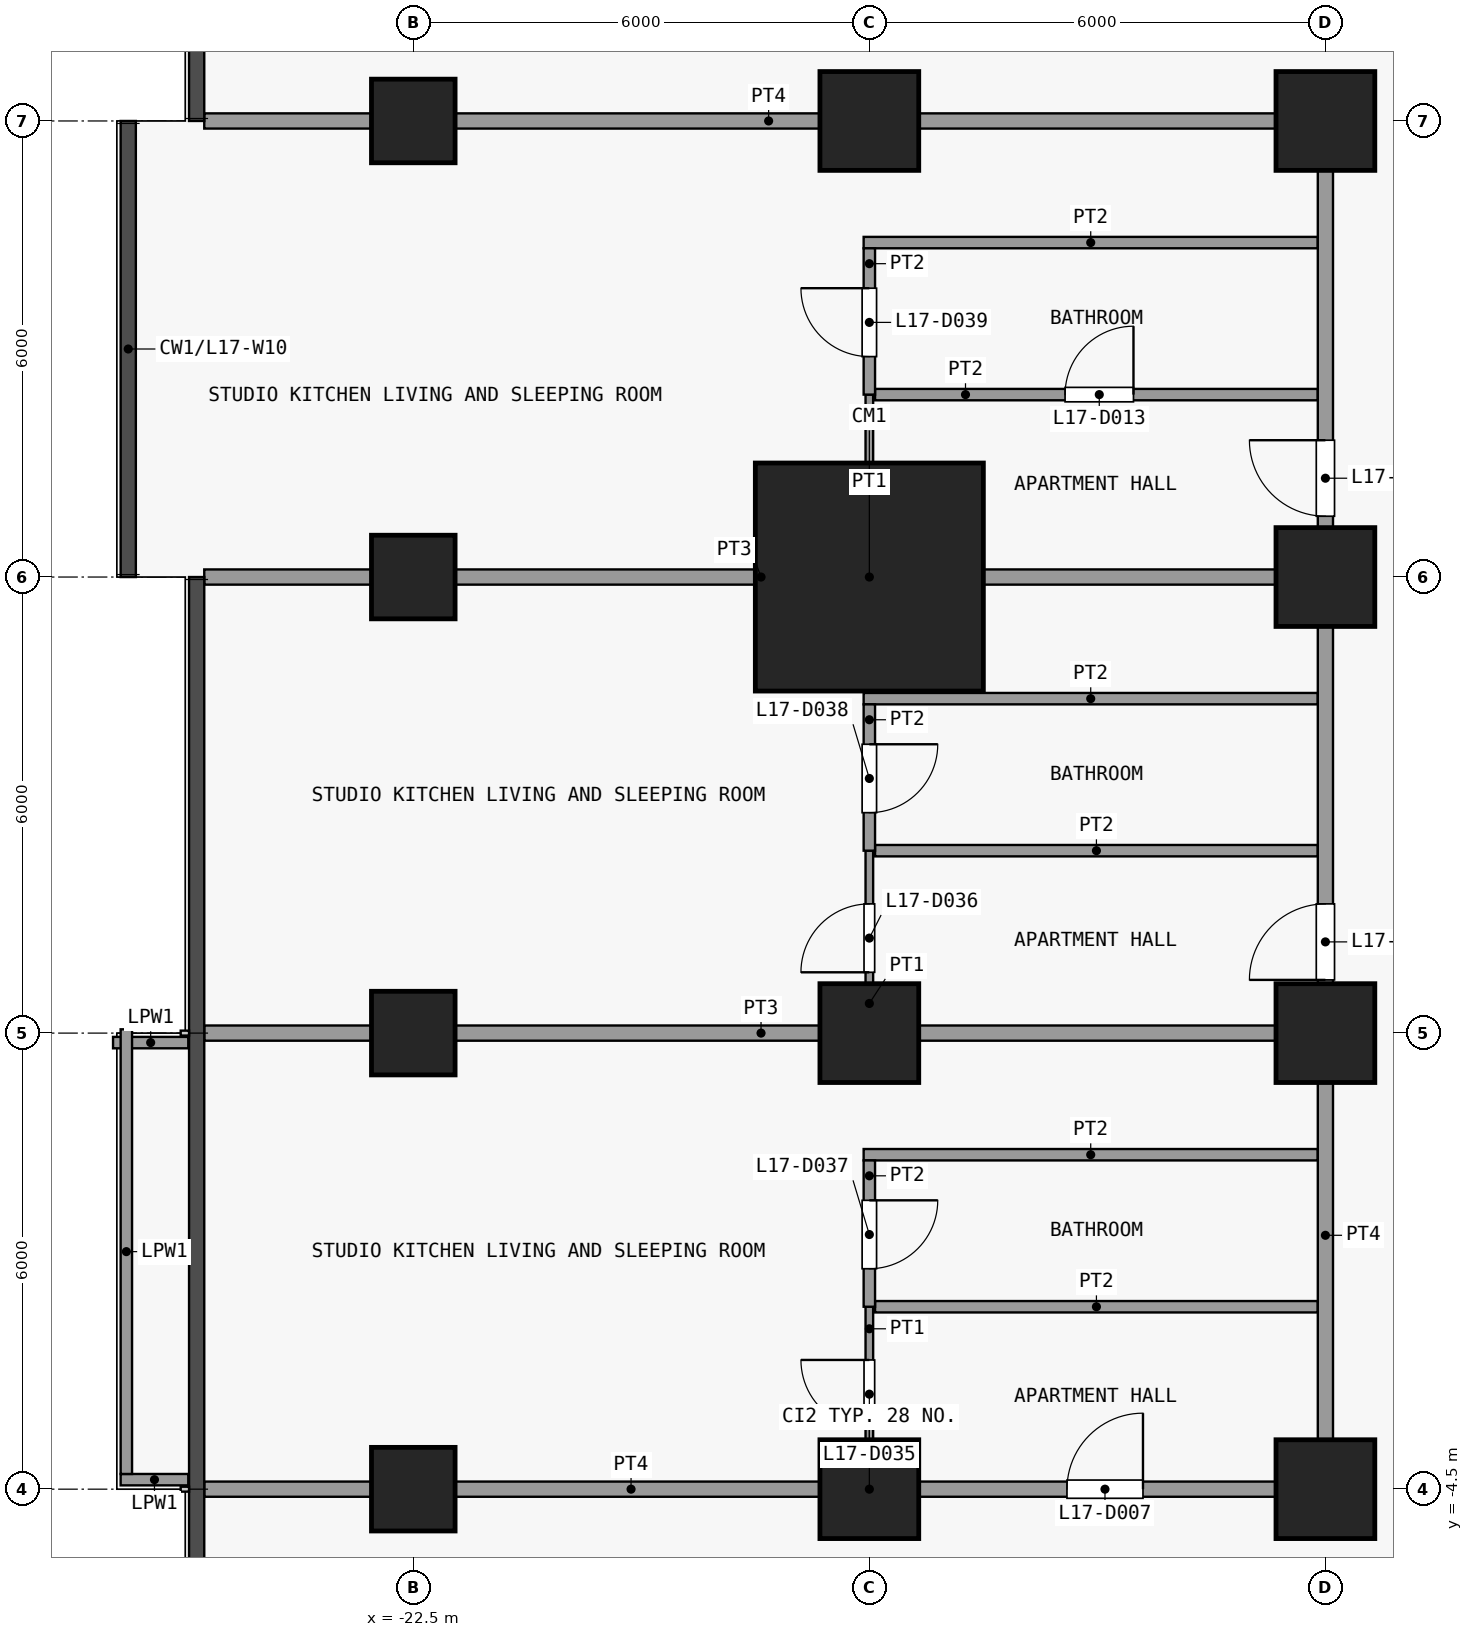
"""IFC4 building model, lengths in metres.
Left out: names, types, materials, properties, quantities, classifications, styles, units other than length and angle.
Written with IfcOpenShell. Run it as: python <this file> out.ifc"""

import sys

from ifc_helpers import new_model, si_unit, direction, frame, frame_2d, origin, origin_2d, place, context, subcontext, project, spatial, rectangle, extrude, element, fill, save


model = new_model("IFC4")
c1 = context("Model", 3, precision=1e-05, world=origin(), true_north=direction((0.0, 1.0)))
c2 = subcontext(c1, "Body", "Model", "MODEL_VIEW")
j1 = project(units=[si_unit("LENGTHUNIT", "METRE"), si_unit("PLANEANGLEUNIT", "RADIAN")], contexts=[c1])
p1 = place(None, origin())
s1 = spatial("IfcSite", under=j1, at=p1, CompositionType="ELEMENT")
p2 = place(p1, origin())
s2 = spatial("IfcBuilding", under=s1, at=p2, CompositionType="ELEMENT")
p3 = place(p2, frame((0.0, 0.0, 72.1)))
s3 = spatial("IfcBuildingStorey", under=s2, at=p3, CompositionType="ELEMENT", Elevation=72.1)
for number, where, z_axis, x_axis in (
    (1, (-22.5, -4.5, 0.0), (0.0, 0.0, 1.0), (1.0, 0.0, 0.0)),
    (2, (-22.5, 1.5, 0.0), (0.0, 0.0, 1.0), (1.0, 0.0, 0.0)),
    (3, (-22.5, 7.5, 0.0), (0.0, 0.0, 1.0), (1.0, 0.0, 0.0)),
    (4, (-22.5, 13.5, 0.0), (0.0, 0.0, 1.0), (1.0, 0.0, 0.0)),
):
    element("IfcColumn", number, at=place(p3, frame(where, z_axis=z_axis, x_axis=x_axis)), inside=s3, PredefinedType="COLUMN", context=c2, shape_type="SweptSolid", body=[
        extrude(rectangle(XDim=1.1, YDim=1.1, at=origin_2d()), origin(), (0.0, 0.0, 1.0), 3.6),
    ])
for number, where, z_axis, x_axis in (
    (5, (-16.5, -4.5, 0.0), (0.0, 0.0, 1.0), (1.0, 0.0, 0.0)),
    (6, (-16.5, 1.5, 0.0), (0.0, 0.0, 1.0), (1.0, 0.0, 0.0)),
):
    element("IfcColumn", number, at=place(p3, frame(where, z_axis=z_axis, x_axis=x_axis)), inside=s3, PredefinedType="COLUMN", context=c2, shape_type="SweptSolid", body=[
        extrude(rectangle(XDim=1.3, YDim=1.3, at=origin_2d()), origin(), (0.0, 0.0, 1.0), 3.6),
    ])
p4 = place(p3, frame((-16.5, 7.5, 0.0), z_axis=(0.0, 0.0, 1.0), x_axis=(1.0, 0.0, 0.0)))
e7 = element("IfcColumn", 7, at=p4, inside=s3, PredefinedType="COLUMN", context=c2, shape_type="SweptSolid", body=[
    extrude(rectangle(XDim=3.0, YDim=3.0, at=origin_2d()), origin(), (0.0, 0.0, 1.0), 3.6),
])
for number, where, z_axis, x_axis in (
    (8, (-16.5, 13.5, 0.0), (0.0, 0.0, 1.0), (1.0, 0.0, 0.0)),
    (9, (-10.5, -4.5, 0.0), (0.0, 0.0, 1.0), (1.0, 0.0, 0.0)),
    (10, (-10.5, 1.5, 0.0), (0.0, 0.0, 1.0), (1.0, 0.0, 0.0)),
    (11, (-10.5, 7.5, 0.0), (0.0, 0.0, 1.0), (1.0, 0.0, 0.0)),
    (12, (-10.5, 13.5, 0.0), (0.0, 0.0, 1.0), (1.0, 0.0, 0.0)),
):
    element("IfcColumn", number, at=place(p3, frame(where, z_axis=z_axis, x_axis=x_axis)), inside=s3, PredefinedType="COLUMN", context=c2, shape_type="SweptSolid", body=[
        extrude(rectangle(XDim=1.3, YDim=1.3, at=origin_2d()), origin(), (0.0, 0.0, 1.0), 3.6),
    ])
p5 = place(p3, frame((-26.45, 1.375, 0.0), z_axis=(0.0, 0.0, 1.0), x_axis=(1.0, 0.0, 0.0)))
e13 = element("IfcWall", 13, at=p5, inside=s3, PredefinedType="PARAPET", context=c2, shape_type="SweptSolid", body=[
    extrude(rectangle(XDim=0.99, YDim=0.15, at=frame_2d((0.495, 0.0))), origin(), (0.0, 0.0, 1.0), 1.15),
])
p6 = place(p3, frame((-25.46, -4.375, 0.0), z_axis=(0.0, 0.0, 1.0), x_axis=(-1.0, 0.0, 0.0)))
e14 = element("IfcWall", 14, at=p6, inside=s3, PredefinedType="PARAPET", context=c2, shape_type="SweptSolid", body=[
    extrude(rectangle(XDim=0.89, YDim=0.15, at=frame_2d((0.445, 0.0))), origin(), (0.0, 0.0, 1.0), 1.15),
])
p7 = place(p3, frame((-26.275, -4.3, 0.0), z_axis=(0.0, 0.0, 1.0), x_axis=(0.0, 1.0, 0.0)))
e15 = element("IfcWall", 15, at=p7, inside=s3, PredefinedType="PARAPET", context=c2, shape_type="SweptSolid", body=[
    extrude(rectangle(XDim=5.85, YDim=0.15, at=frame_2d((2.925, 0.0))), origin(), (0.0, 0.0, 1.0), 1.15),
])
p8 = place(p3, frame((-25.25, -4.5, 0.0), z_axis=(0.0, 0.0, 1.0), x_axis=(1.0, 0.0, 0.0)))
e16 = element("IfcWall", 16, at=p8, inside=s3, PredefinedType="PARTITIONING", context=c2, shape_type="SweptSolid", body=[
    extrude(rectangle(XDim=14.85, YDim=0.2, at=frame_2d((7.425, 0.0))), origin(), (0.0, 0.0, 1.0), 3.15),
])
p9 = place(p8, frame((11.35, 0.0, 0.0)))
e17 = element("IfcOpeningElement", 17, at=p9, cuts=e16, PredefinedType="OPENING", context=c2, shape_type="SweptSolid", body=[
    extrude(rectangle(XDim=1.0, YDim=2.1, at=frame_2d((0.5, 1.05))), frame((0.0, 0.11, 0.0), z_axis=(0.0, -1.0, 0.0), x_axis=(1.0, 0.0, 0.0)), (0.0, 0.0, 1.0), 0.22),
])
p10 = place(p3, frame((-16.425, -2.1, 0.0), z_axis=(0.0, 0.0, 1.0), x_axis=(1.0, 0.0, 0.0)))
e18 = element("IfcWall", 18, at=p10, inside=s3, PredefinedType="PARTITIONING", context=c2, shape_type="SweptSolid", body=[
    extrude(rectangle(XDim=5.825, YDim=0.15, at=frame_2d((2.913, 0.0))), origin(), (0.0, 0.0, 1.0), 3.15),
])
p11 = place(p3, frame((-16.575, -0.1, 0.0), z_axis=(0.0, 0.0, 1.0), x_axis=(1.0, 0.0, 0.0)))
e19 = element("IfcWall", 19, at=p11, inside=s3, PredefinedType="PARTITIONING", context=c2, shape_type="SweptSolid", body=[
    extrude(rectangle(XDim=5.975, YDim=0.15, at=frame_2d((2.987, 0.0))), origin(), (0.0, 0.0, 1.0), 3.15),
])
p12 = place(p3, frame((-25.25, 1.5, 0.0), z_axis=(0.0, 0.0, 1.0), x_axis=(1.0, 0.0, 0.0)))
e20 = element("IfcWall", 20, at=p12, inside=s3, PredefinedType="PARTITIONING", context=c2, shape_type="SweptSolid", body=[
    extrude(rectangle(XDim=14.65, YDim=0.2, at=frame_2d((7.325, 0.0))), origin(), (0.0, 0.0, 1.0), 3.15),
])
p13 = place(p3, frame((-16.425, 3.9, 0.0), z_axis=(0.0, 0.0, 1.0), x_axis=(1.0, 0.0, 0.0)))
e21 = element("IfcWall", 21, at=p13, inside=s3, PredefinedType="PARTITIONING", context=c2, shape_type="SweptSolid", body=[
    extrude(rectangle(XDim=5.825, YDim=0.15, at=frame_2d((2.913, 0.0))), origin(), (0.0, 0.0, 1.0), 3.15),
])
p14 = place(p3, frame((-16.575, 5.9, 0.0), z_axis=(0.0, 0.0, 1.0), x_axis=(1.0, 0.0, 0.0)))
e22 = element("IfcWall", 22, at=p14, inside=s3, PredefinedType="PARTITIONING", context=c2, shape_type="SweptSolid", body=[
    extrude(rectangle(XDim=5.975, YDim=0.15, at=frame_2d((2.987, 0.0))), origin(), (0.0, 0.0, 1.0), 3.15),
])
p15 = place(p3, frame((-25.25, 7.5, 0.0), z_axis=(0.0, 0.0, 1.0), x_axis=(1.0, 0.0, 0.0)))
e23 = element("IfcWall", 23, at=p15, inside=s3, PredefinedType="PARTITIONING", context=c2, shape_type="SweptSolid", body=[
    extrude(rectangle(XDim=14.65, YDim=0.2, at=frame_2d((7.325, 0.0))), origin(), (0.0, 0.0, 1.0), 3.15),
])
p16 = place(p3, frame((-16.425, 9.9, 0.0), z_axis=(0.0, 0.0, 1.0), x_axis=(1.0, 0.0, 0.0)))
e24 = element("IfcWall", 24, at=p16, inside=s3, PredefinedType="PARTITIONING", context=c2, shape_type="SweptSolid", body=[
    extrude(rectangle(XDim=5.825, YDim=0.15, at=frame_2d((2.913, 0.0))), origin(), (0.0, 0.0, 1.0), 3.15),
])
p17 = place(p16, frame((2.5, 0.0, 0.0)))
e25 = element("IfcOpeningElement", 25, at=p17, cuts=e24, PredefinedType="OPENING", context=c2, shape_type="SweptSolid", body=[
    extrude(rectangle(XDim=0.9, YDim=2.1, at=frame_2d((0.45, 1.05))), frame((0.0, 0.085, 0.0), z_axis=(0.0, -1.0, 0.0), x_axis=(1.0, 0.0, 0.0)), (0.0, 0.0, 1.0), 0.17),
])
p18 = place(p3, frame((-16.575, 11.9, 0.0), z_axis=(0.0, 0.0, 1.0), x_axis=(1.0, 0.0, 0.0)))
e26 = element("IfcWall", 26, at=p18, inside=s3, PredefinedType="PARTITIONING", context=c2, shape_type="SweptSolid", body=[
    extrude(rectangle(XDim=5.975, YDim=0.15, at=frame_2d((2.987, 0.0))), origin(), (0.0, 0.0, 1.0), 3.15),
])
p19 = place(p3, frame((-25.25, 13.5, 0.0), z_axis=(0.0, 0.0, 1.0), x_axis=(1.0, 0.0, 0.0)))
e27 = element("IfcWall", 27, at=p19, inside=s3, PredefinedType="PARTITIONING", context=c2, shape_type="SweptSolid", body=[
    extrude(rectangle(XDim=14.85, YDim=0.2, at=frame_2d((7.425, 0.0))), origin(), (0.0, 0.0, 1.0), 3.15),
])
p20 = place(p3, frame((-16.5, -4.4, 0.0), z_axis=(0.0, 0.0, 1.0), x_axis=(0.0, 1.0, 0.0)))
e28 = element("IfcWall", 28, at=p20, inside=s3, PredefinedType="PARTITIONING", context=c2, shape_type="SweptSolid", body=[
    extrude(rectangle(XDim=2.3, YDim=0.1, at=frame_2d((1.15, 0.0))), origin(), (0.0, 0.0, 1.0), 3.15),
])
p21 = place(p20, frame((0.7, 0.0, 0.0)))
e29 = element("IfcOpeningElement", 29, at=p21, cuts=e28, PredefinedType="OPENING", context=c2, shape_type="SweptSolid", body=[
    extrude(rectangle(XDim=0.9, YDim=2.1, at=frame_2d((0.45, 1.05))), frame((0.0, 0.06, 0.0), z_axis=(0.0, -1.0, 0.0), x_axis=(1.0, 0.0, 0.0)), (0.0, 0.0, 1.0), 0.12),
])
p22 = place(p3, frame((-16.5, 1.6, 0.0), z_axis=(0.0, 0.0, 1.0), x_axis=(0.0, 1.0, 0.0)))
e30 = element("IfcWall", 30, at=p22, inside=s3, PredefinedType="PARTITIONING", context=c2, shape_type="SweptSolid", body=[
    extrude(rectangle(XDim=2.3, YDim=0.1, at=frame_2d((1.15, 0.0))), origin(), (0.0, 0.0, 1.0), 3.15),
])
p23 = place(p22, frame((0.7, 0.0, 0.0)))
e31 = element("IfcOpeningElement", 31, at=p23, cuts=e30, PredefinedType="OPENING", context=c2, shape_type="SweptSolid", body=[
    extrude(rectangle(XDim=0.9, YDim=2.1, at=frame_2d((0.45, 1.05))), frame((0.0, 0.06, 0.0), z_axis=(0.0, -1.0, 0.0), x_axis=(1.0, 0.0, 0.0)), (0.0, 0.0, 1.0), 0.12),
])
p24 = place(p3, frame((-16.5, 7.6, 0.0), z_axis=(0.0, 0.0, 1.0), x_axis=(0.0, 1.0, 0.0)))
e32 = element("IfcWall", 32, at=p24, inside=s3, PredefinedType="PARTITIONING", context=c2, shape_type="SweptSolid", body=[
    extrude(rectangle(XDim=2.3, YDim=0.1, at=frame_2d((1.15, 0.0))), origin(), (0.0, 0.0, 1.0), 3.15),
])
p25 = place(p3, frame((-16.5, -2.1, 0.0), z_axis=(0.0, 0.0, 1.0), x_axis=(0.0, 1.0, 0.0)))
e33 = element("IfcWall", 33, at=p25, inside=s3, PredefinedType="PARTITIONING", context=c2, shape_type="SweptSolid", body=[
    extrude(rectangle(XDim=1.925, YDim=0.15, at=frame_2d((0.962, 0.0))), origin(), (0.0, 0.0, 1.0), 3.15),
])
p26 = place(p25, frame((0.5, 0.0, 0.0)))
e34 = element("IfcOpeningElement", 34, at=p26, cuts=e33, PredefinedType="OPENING", context=c2, shape_type="SweptSolid", body=[
    extrude(rectangle(XDim=0.9, YDim=2.1, at=frame_2d((0.45, 1.05))), frame((0.0, 0.085, 0.0), z_axis=(0.0, -1.0, 0.0), x_axis=(1.0, 0.0, 0.0)), (0.0, 0.0, 1.0), 0.17),
])
p27 = place(p3, frame((-16.5, 3.9, 0.0), z_axis=(0.0, 0.0, 1.0), x_axis=(0.0, 1.0, 0.0)))
e35 = element("IfcWall", 35, at=p27, inside=s3, PredefinedType="PARTITIONING", context=c2, shape_type="SweptSolid", body=[
    extrude(rectangle(XDim=1.925, YDim=0.15, at=frame_2d((0.962, 0.0))), origin(), (0.0, 0.0, 1.0), 3.15),
])
p28 = place(p27, frame((0.5, 0.0, 0.0)))
e36 = element("IfcOpeningElement", 36, at=p28, cuts=e35, PredefinedType="OPENING", context=c2, shape_type="SweptSolid", body=[
    extrude(rectangle(XDim=0.9, YDim=2.1, at=frame_2d((0.45, 1.05))), frame((0.0, 0.085, 0.0), z_axis=(0.0, -1.0, 0.0), x_axis=(1.0, 0.0, 0.0)), (0.0, 0.0, 1.0), 0.17),
])
p29 = place(p3, frame((-16.5, 9.9, 0.0), z_axis=(0.0, 0.0, 1.0), x_axis=(0.0, 1.0, 0.0)))
e37 = element("IfcWall", 37, at=p29, inside=s3, PredefinedType="PARTITIONING", context=c2, shape_type="SweptSolid", body=[
    extrude(rectangle(XDim=1.925, YDim=0.15, at=frame_2d((0.962, 0.0))), origin(), (0.0, 0.0, 1.0), 3.15),
])
p30 = place(p29, frame((0.5, 0.0, 0.0)))
e38 = element("IfcOpeningElement", 38, at=p30, cuts=e37, PredefinedType="OPENING", context=c2, shape_type="SweptSolid", body=[
    extrude(rectangle(XDim=0.9, YDim=2.1, at=frame_2d((0.45, 1.05))), frame((0.0, 0.085, 0.0), z_axis=(0.0, -1.0, 0.0), x_axis=(1.0, 0.0, 0.0)), (0.0, 0.0, 1.0), 0.17),
])
p31 = place(p3, frame((-10.5, -4.4, 0.0), z_axis=(0.0, 0.0, 1.0), x_axis=(0.0, 1.0, 0.0)))
e39 = element("IfcWall", 39, at=p31, inside=s3, PredefinedType="PARTITIONING", context=c2, shape_type="SweptSolid", body=[
    extrude(rectangle(XDim=17.8, YDim=0.2, at=frame_2d((8.9, 0.0))), origin(), (0.0, 0.0, 1.0), 3.15),
])
p32 = place(p31, frame((6.6, 0.0, 0.0)))
e40 = element("IfcOpeningElement", 40, at=p32, cuts=e39, PredefinedType="OPENING", context=c2, shape_type="SweptSolid", body=[
    extrude(rectangle(XDim=1.0, YDim=2.1, at=frame_2d((0.5, 1.05))), frame((0.0, 0.11, 0.0), z_axis=(0.0, -1.0, 0.0), x_axis=(1.0, 0.0, 0.0)), (0.0, 0.0, 1.0), 0.22),
])
p33 = place(p31, frame((12.7, 0.0, 0.0)))
e41 = element("IfcOpeningElement", 41, at=p33, cuts=e39, PredefinedType="OPENING", context=c2, shape_type="SweptSolid", body=[
    extrude(rectangle(XDim=1.0, YDim=2.1, at=frame_2d((0.5, 1.05))), frame((0.0, 0.11, 0.0), z_axis=(0.0, -1.0, 0.0), x_axis=(1.0, 0.0, 0.0)), (0.0, 0.0, 1.0), 0.22),
])
p34 = place(p9, origin())
e42 = element("IfcDoor", 42, at=p34, inside=s3, OperationType="SINGLE_SWING_LEFT", PredefinedType="DOOR", context=c2, shape_type="SweptSolid", body=[
    extrude(rectangle(XDim=1.0, YDim=2.1, at=frame_2d((0.5, 1.05))), frame((0.0, 0.025, 0.0), z_axis=(0.0, -1.0, 0.0), x_axis=(1.0, 0.0, 0.0)), (0.0, 0.0, 1.0), 0.05),
])
fill(e17, e42)
p35 = place(p17, origin())
e43 = element("IfcDoor", 43, at=p35, inside=s3, OperationType="SINGLE_SWING_LEFT", PredefinedType="DOOR", context=c2, shape_type="SweptSolid", body=[
    extrude(rectangle(XDim=0.9, YDim=2.1, at=frame_2d((0.45, 1.05))), frame((0.0, 0.025, 0.0), z_axis=(0.0, -1.0, 0.0), x_axis=(1.0, 0.0, 0.0)), (0.0, 0.0, 1.0), 0.05),
])
fill(e25, e43)
p36 = place(p21, origin())
e44 = element("IfcDoor", 44, at=p36, inside=s3, OperationType="SINGLE_SWING_LEFT", PredefinedType="DOOR", context=c2, shape_type="SweptSolid", body=[
    extrude(rectangle(XDim=0.9, YDim=2.1, at=frame_2d((0.45, 1.05))), frame((0.0, 0.025, 0.0), z_axis=(0.0, -1.0, 0.0), x_axis=(1.0, 0.0, 0.0)), (0.0, 0.0, 1.0), 0.05),
])
fill(e29, e44)
p37 = place(p23, origin())
e45 = element("IfcDoor", 45, at=p37, inside=s3, OperationType="SINGLE_SWING_RIGHT", PredefinedType="DOOR", context=c2, shape_type="SweptSolid", body=[
    extrude(rectangle(XDim=0.9, YDim=2.1, at=frame_2d((0.45, 1.05))), frame((0.0, 0.025, 0.0), z_axis=(0.0, -1.0, 0.0), x_axis=(1.0, 0.0, 0.0)), (0.0, 0.0, 1.0), 0.05),
])
fill(e31, e45)
p38 = place(p26, origin())
e46 = element("IfcDoor", 46, at=p38, inside=s3, OperationType="SINGLE_SWING_RIGHT", PredefinedType="DOOR", context=c2, shape_type="SweptSolid", body=[
    extrude(rectangle(XDim=0.9, YDim=2.1, at=frame_2d((0.45, 1.05))), frame((0.0, 0.025, 0.0), z_axis=(0.0, -1.0, 0.0), x_axis=(1.0, 0.0, 0.0)), (0.0, 0.0, 1.0), 0.05),
])
fill(e34, e46)
p39 = place(p28, origin())
e47 = element("IfcDoor", 47, at=p39, inside=s3, OperationType="SINGLE_SWING_RIGHT", PredefinedType="DOOR", context=c2, shape_type="SweptSolid", body=[
    extrude(rectangle(XDim=0.9, YDim=2.1, at=frame_2d((0.45, 1.05))), frame((0.0, 0.025, 0.0), z_axis=(0.0, -1.0, 0.0), x_axis=(1.0, 0.0, 0.0)), (0.0, 0.0, 1.0), 0.05),
])
fill(e36, e47)
p40 = place(p30, origin())
e48 = element("IfcDoor", 48, at=p40, inside=s3, OperationType="SINGLE_SWING_LEFT", PredefinedType="DOOR", context=c2, shape_type="SweptSolid", body=[
    extrude(rectangle(XDim=0.9, YDim=2.1, at=frame_2d((0.45, 1.05))), frame((0.0, 0.025, 0.0), z_axis=(0.0, -1.0, 0.0), x_axis=(1.0, 0.0, 0.0)), (0.0, 0.0, 1.0), 0.05),
])
fill(e38, e48)
p41 = place(p32, origin())
e49 = element("IfcDoor", 49, at=p41, inside=s3, OperationType="SINGLE_SWING_RIGHT", PredefinedType="DOOR", context=c2, shape_type="SweptSolid", body=[
    extrude(rectangle(XDim=1.0, YDim=2.1, at=frame_2d((0.5, 1.05))), frame((0.0, 0.025, 0.0), z_axis=(0.0, -1.0, 0.0), x_axis=(1.0, 0.0, 0.0)), (0.0, 0.0, 1.0), 0.05),
])
fill(e40, e49)
p42 = place(p33, origin())
e50 = element("IfcDoor", 50, at=p42, inside=s3, OperationType="SINGLE_SWING_LEFT", PredefinedType="DOOR", context=c2, shape_type="SweptSolid", body=[
    extrude(rectangle(XDim=1.0, YDim=2.1, at=frame_2d((0.5, 1.05))), frame((0.0, 0.025, 0.0), z_axis=(0.0, -1.0, 0.0), x_axis=(1.0, 0.0, 0.0)), (0.0, 0.0, 1.0), 0.05),
])
fill(e41, e50)
save(model, sys.argv[1])
